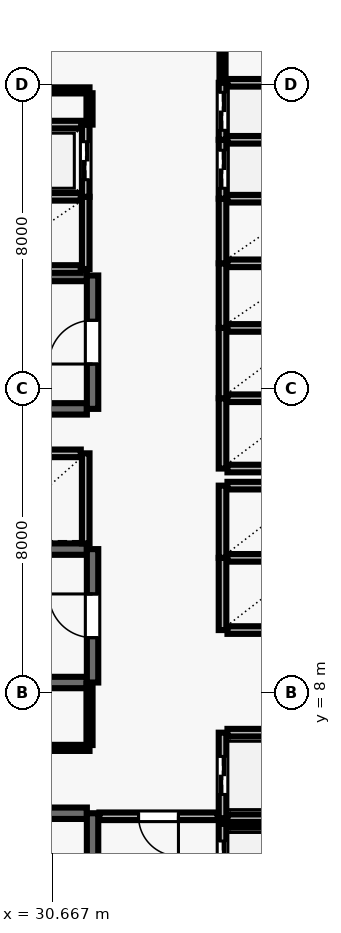
"""IFC4 building model, lengths in metres.
Left out: names, types, materials, properties, quantities, classifications, styles, units other than length and angle.
Written with IfcOpenShell. Run it as: python <this file> out.ifc"""

import sys

from ifc_helpers import new_model, si_unit, direction, frame, frame_2d, origin, place, context, subcontext, project, spatial, rectangle, extrude, element, fill, save


model = new_model("IFC4")
c1 = context("Model", 3, precision=1e-05, world=origin(), true_north=direction((0.0, 1.0)))
c2 = subcontext(c1, "Body", "Model", "MODEL_VIEW")
j1 = project(units=[si_unit("LENGTHUNIT", "METRE"), si_unit("PLANEANGLEUNIT", "RADIAN")], contexts=[c1])
p1 = place(None, origin())
s1 = spatial("IfcSite", under=j1, at=p1, CompositionType="ELEMENT")
p2 = place(p1, origin())
s2 = spatial("IfcBuilding", under=s1, at=p2, CompositionType="ELEMENT")
p3 = place(p2, frame((0.0, 0.0, 42.7)))
s3 = spatial("IfcBuildingStorey", under=s2, at=p3, CompositionType="ELEMENT", Elevation=42.7)
p4 = place(p3, frame((31.58, 4.83, 0.0), z_axis=(0.0, 0.0, 1.0), x_axis=(-1.0, 0.0, 0.0)))
e1 = element("IfcWall", 1, at=p4, inside=s3, PredefinedType="SHEAR", context=c2, shape_type="SweptSolid", body=[
    extrude(rectangle(XDim=8.36, YDim=0.3, at=frame_2d((4.18, 0.0))), origin(), (0.0, 0.0, 1.0), 3.69),
])
p5 = place(p3, frame((31.73, 0.96, 0.0), z_axis=(0.0, 0.0, 1.0), x_axis=(0.0, 1.0, 0.0)))
e2 = element("IfcWall", 2, at=p5, inside=s3, PredefinedType="SHEAR", context=c2, shape_type="SweptSolid", body=[
    extrude(rectangle(XDim=3.87, YDim=0.3, at=frame_2d((1.935, 0.0))), origin(), (0.0, 0.0, 1.0), 3.69),
])
p6 = place(p5, frame((1.54, 0.0, 0.0)))
e3 = element("IfcOpeningElement", 3, at=p6, cuts=e2, PredefinedType="OPENING", context=c2, shape_type="SweptSolid", body=[
    extrude(rectangle(XDim=1.15, YDim=2.15, at=frame_2d((0.575, 1.075))), frame((0.0, 0.16, 0.0), z_axis=(0.0, -1.0, 0.0), x_axis=(1.0, 0.0, 0.0)), (0.0, 0.0, 1.0), 0.32),
])
for number, where, z_axis, x_axis in (
    (4, (31.58, 18.98, 0.0), (0.0, 0.0, 1.0), (-1.0, 0.0, 0.0)),
    (5, (23.22, 15.47, 0.0), (0.0, 0.0, 1.0), (1.0, 0.0, 0.0)),
):
    element("IfcWall", number, at=place(p3, frame(where, z_axis=z_axis, x_axis=x_axis)), inside=s3, PredefinedType="SHEAR", context=c2, shape_type="SweptSolid", body=[
        extrude(rectangle(XDim=8.36, YDim=0.3, at=frame_2d((4.18, 0.0))), origin(), (0.0, 0.0, 1.0), 3.69),
    ])
p7 = place(p3, frame((31.73, 15.47, 0.0), z_axis=(0.0, 0.0, 1.0), x_axis=(0.0, 1.0, 0.0)))
e6 = element("IfcWall", 6, at=p7, inside=s3, PredefinedType="SHEAR", context=c2, shape_type="SweptSolid", body=[
    extrude(rectangle(XDim=3.51, YDim=0.3, at=frame_2d((1.755, 0.0))), origin(), (0.0, 0.0, 1.0), 3.69),
])
p8 = place(p7, frame((1.18, 0.0, 0.0)))
e7 = element("IfcOpeningElement", 7, at=p8, cuts=e6, PredefinedType="OPENING", context=c2, shape_type="SweptSolid", body=[
    extrude(rectangle(XDim=1.15, YDim=2.15, at=frame_2d((0.575, 1.075))), frame((0.0, 0.16, 0.0), z_axis=(0.0, -1.0, 0.0), x_axis=(1.0, 0.0, 0.0)), (0.0, 0.0, 1.0), 0.32),
])
for number, where, z_axis, x_axis in (
    (8, (31.58, 11.78, 0.0), (0.0, 0.0, 1.0), (-1.0, 0.0, 0.0)),
    (9, (23.22, 8.27, 0.0), (0.0, 0.0, 1.0), (1.0, 0.0, 0.0)),
):
    element("IfcWall", number, at=place(p3, frame(where, z_axis=z_axis, x_axis=x_axis)), inside=s3, PredefinedType="SHEAR", context=c2, shape_type="SweptSolid", body=[
        extrude(rectangle(XDim=8.36, YDim=0.3, at=frame_2d((4.18, 0.0))), origin(), (0.0, 0.0, 1.0), 3.69),
    ])
p9 = place(p3, frame((31.73, 8.27, 0.0), z_axis=(0.0, 0.0, 1.0), x_axis=(0.0, 1.0, 0.0)))
e10 = element("IfcWall", 10, at=p9, inside=s3, PredefinedType="SHEAR", context=c2, shape_type="SweptSolid", body=[
    extrude(rectangle(XDim=3.51, YDim=0.3, at=frame_2d((1.755, 0.0))), origin(), (0.0, 0.0, 1.0), 3.69),
])
p10 = place(p9, frame((1.18, 0.0, 0.0)))
e11 = element("IfcOpeningElement", 11, at=p10, cuts=e10, PredefinedType="OPENING", context=c2, shape_type="SweptSolid", body=[
    extrude(rectangle(XDim=1.15, YDim=2.15, at=frame_2d((0.575, 1.075))), frame((0.0, 0.16, 0.0), z_axis=(0.0, -1.0, 0.0), x_axis=(1.0, 0.0, 0.0)), (0.0, 0.0, 1.0), 0.32),
])
p11 = place(p3, frame((35.15, 4.55, 0.0), z_axis=(0.0, 0.0, 1.0), x_axis=(0.0, -1.0, 0.0)))
e12 = element("IfcWall", 12, at=p11, inside=s3, PredefinedType="SOLIDWALL", context=c2, shape_type="SweptSolid", body=[
    extrude(rectangle(XDim=2.1, YDim=0.2, at=frame_2d((1.05, 0.0))), origin(), (0.0, 0.0, 1.0), 3.69),
])
p12 = place(p11, frame((0.45, 0.0, 0.0)))
e13 = element("IfcOpeningElement", 13, at=p12, cuts=e12, PredefinedType="OPENING", context=c2, shape_type="SweptSolid", body=[
    extrude(rectangle(XDim=1.2, YDim=2.15, at=frame_2d((0.6, 1.075))), frame((0.0, 0.11, 0.0), z_axis=(0.0, -1.0, 0.0), x_axis=(1.0, 0.0, 0.0)), (0.0, 0.0, 1.0), 0.22),
])
p13 = place(p3, frame((37.42, 4.55, 0.0), z_axis=(0.0, 0.0, 1.0), x_axis=(-1.0, 0.0, 0.0)))
e14 = element("IfcWall", 14, at=p13, inside=s3, PredefinedType="SOLIDWALL", context=c2, shape_type="SweptSolid", body=[
    extrude(rectangle(XDim=2.14, YDim=0.2, at=frame_2d((1.07, 0.0))), origin(), (0.0, 0.0, 1.0), 3.69),
])
p14 = place(p3, frame((35.15, 6.95, 0.0), z_axis=(0.0, 0.0, 1.0), x_axis=(0.0, -1.0, 0.0)))
e15 = element("IfcWall", 15, at=p14, inside=s3, PredefinedType="SOLIDWALL", context=c2, shape_type="SweptSolid", body=[
    extrude(rectangle(XDim=2.25, YDim=0.2, at=frame_2d((1.125, 0.0))), origin(), (0.0, 0.0, 1.0), 3.69),
])
p15 = place(p14, frame((0.625, 0.0, 0.0)))
e16 = element("IfcOpeningElement", 16, at=p15, cuts=e15, PredefinedType="OPENING", context=c2, shape_type="SweptSolid", body=[
    extrude(rectangle(XDim=1.0, YDim=2.1, at=frame_2d((0.5, 1.05))), frame((0.0, 0.11, 0.0), z_axis=(0.0, -1.0, 0.0), x_axis=(1.0, 0.0, 0.0)), (0.0, 0.0, 1.0), 0.22),
])
for number, where, z_axis, x_axis in (
    (17, (35.28, 4.7, 0.0), (0.0, 0.0, 1.0), (1.0, 0.0, 0.0)),
    (18, (37.42, 6.95, 0.0), (0.0, 0.0, 1.0), (-1.0, 0.0, 0.0)),
):
    element("IfcWall", number, at=place(p3, frame(where, z_axis=z_axis, x_axis=x_axis)), inside=s3, PredefinedType="SOLIDWALL", context=c2, shape_type="SweptSolid", body=[
        extrude(rectangle(XDim=2.14, YDim=0.2, at=frame_2d((1.07, 0.0))), origin(), (0.0, 0.0, 1.0), 3.69),
    ])
p16 = place(p3, frame((35.15, 11.55, 0.0), z_axis=(0.0, 0.0, 1.0), x_axis=(0.0, -1.0, 0.0)))
e19 = element("IfcWall", 19, at=p16, inside=s3, PredefinedType="SOLIDWALL", context=c2, shape_type="SweptSolid", body=[
    extrude(rectangle(XDim=1.9, YDim=0.2, at=frame_2d((0.95, 0.0))), origin(), (0.0, 0.0, 1.0), 3.69),
])
for number, where, z_axis, x_axis in (
    (20, (35.28, 9.65, 0.0), (0.0, 0.0, 1.0), (1.0, 0.0, 0.0)),
    (21, (37.42, 11.55, 0.0), (0.0, 0.0, 1.0), (-1.0, 0.0, 0.0)),
):
    element("IfcWall", number, at=place(p3, frame(where, z_axis=z_axis, x_axis=x_axis)), inside=s3, PredefinedType="SOLIDWALL", context=c2, shape_type="SweptSolid", body=[
        extrude(rectangle(XDim=2.14, YDim=0.2, at=frame_2d((1.07, 0.0))), origin(), (0.0, 0.0, 1.0), 3.69),
    ])
p17 = place(p3, frame((35.15, 13.45, 0.0), z_axis=(0.0, 0.0, 1.0), x_axis=(0.0, -1.0, 0.0)))
e22 = element("IfcWall", 22, at=p17, inside=s3, PredefinedType="SOLIDWALL", context=c2, shape_type="SweptSolid", body=[
    extrude(rectangle(XDim=1.9, YDim=0.2, at=frame_2d((0.95, 0.0))), origin(), (0.0, 0.0, 1.0), 3.69),
])
p18 = place(p3, frame((37.42, 13.45, 0.0), z_axis=(0.0, 0.0, 1.0), x_axis=(-1.0, 0.0, 0.0)))
e23 = element("IfcWall", 23, at=p18, inside=s3, PredefinedType="SOLIDWALL", context=c2, shape_type="SweptSolid", body=[
    extrude(rectangle(XDim=2.14, YDim=0.2, at=frame_2d((1.07, 0.0))), origin(), (0.0, 0.0, 1.0), 3.69),
])
p19 = place(p3, frame((31.55, 11.93, 0.0), z_axis=(0.0, 0.0, 1.0), x_axis=(0.0, 1.0, 0.0)))
e24 = element("IfcWall", 24, at=p19, inside=s3, PredefinedType="SOLIDWALL", context=c2, shape_type="SweptSolid", body=[
    extrude(rectangle(XDim=2.37, YDim=0.2, at=frame_2d((1.185, 0.0))), origin(), (0.0, 0.0, 1.0), 3.69),
])
p20 = place(p3, frame((31.42, 14.3, 0.0), z_axis=(0.0, 0.0, 1.0), x_axis=(-1.0, 0.0, 0.0)))
e25 = element("IfcWall", 25, at=p20, inside=s3, PredefinedType="SOLIDWALL", context=c2, shape_type="SweptSolid", body=[
    extrude(rectangle(XDim=2.44, YDim=0.2, at=frame_2d((1.22, 0.0))), origin(), (0.0, 0.0, 1.0), 3.69),
])
p21 = place(p3, frame((35.15, 15.75, 0.0), z_axis=(0.0, 0.0, 1.0), x_axis=(0.0, -1.0, 0.0)))
e26 = element("IfcWall", 26, at=p21, inside=s3, PredefinedType="SOLIDWALL", context=c2, shape_type="SweptSolid", body=[
    extrude(rectangle(XDim=1.85, YDim=0.2, at=frame_2d((0.925, 0.0))), origin(), (0.0, 0.0, 1.0), 3.69),
])
for number, where, z_axis, x_axis in (
    (27, (35.28, 13.9, 0.0), (0.0, 0.0, 1.0), (1.0, 0.0, 0.0)),
    (28, (37.42, 15.75, 0.0), (0.0, 0.0, 1.0), (-1.0, 0.0, 0.0)),
):
    element("IfcWall", number, at=place(p3, frame(where, z_axis=z_axis, x_axis=x_axis)), inside=s3, PredefinedType="SOLIDWALL", context=c2, shape_type="SweptSolid", body=[
        extrude(rectangle(XDim=2.14, YDim=0.2, at=frame_2d((1.07, 0.0))), origin(), (0.0, 0.0, 1.0), 3.69),
    ])
p22 = place(p3, frame((35.15, 17.6, 0.0), z_axis=(0.0, 0.0, 1.0), x_axis=(0.0, -1.0, 0.0)))
e29 = element("IfcWall", 29, at=p22, inside=s3, PredefinedType="SOLIDWALL", context=c2, shape_type="SweptSolid", body=[
    extrude(rectangle(XDim=1.85, YDim=0.2, at=frame_2d((0.925, 0.0))), origin(), (0.0, 0.0, 1.0), 3.69),
])
p23 = place(p3, frame((37.42, 17.6, 0.0), z_axis=(0.0, 0.0, 1.0), x_axis=(-1.0, 0.0, 0.0)))
e30 = element("IfcWall", 30, at=p23, inside=s3, PredefinedType="SOLIDWALL", context=c2, shape_type="SweptSolid", body=[
    extrude(rectangle(XDim=2.14, YDim=0.2, at=frame_2d((1.07, 0.0))), origin(), (0.0, 0.0, 1.0), 3.69),
])
p24 = place(p3, frame((35.15, 19.3, 0.0), z_axis=(0.0, 0.0, 1.0), x_axis=(0.0, -1.0, 0.0)))
e31 = element("IfcWall", 31, at=p24, inside=s3, PredefinedType="SOLIDWALL", context=c2, shape_type="SweptSolid", body=[
    extrude(rectangle(XDim=1.7, YDim=0.2, at=frame_2d((0.85, 0.0))), origin(), (0.0, 0.0, 1.0), 3.69),
])
p25 = place(p3, frame((37.42, 19.3, 0.0), z_axis=(0.0, 0.0, 1.0), x_axis=(-1.0, 0.0, 0.0)))
e32 = element("IfcWall", 32, at=p25, inside=s3, PredefinedType="SOLIDWALL", context=c2, shape_type="SweptSolid", body=[
    extrude(rectangle(XDim=2.14, YDim=0.2, at=frame_2d((1.07, 0.0))), origin(), (0.0, 0.0, 1.0), 3.69),
])
p26 = place(p3, frame((35.15, 21.0, 0.0), z_axis=(0.0, 0.0, 1.0), x_axis=(0.0, -1.0, 0.0)))
e33 = element("IfcWall", 33, at=p26, inside=s3, PredefinedType="SOLIDWALL", context=c2, shape_type="SweptSolid", body=[
    extrude(rectangle(XDim=1.7, YDim=0.2, at=frame_2d((0.85, 0.0))), origin(), (0.0, 0.0, 1.0), 3.69),
])
p27 = place(p3, frame((37.42, 21.0, 0.0), z_axis=(0.0, 0.0, 1.0), x_axis=(-1.0, 0.0, 0.0)))
e34 = element("IfcWall", 34, at=p27, inside=s3, PredefinedType="SOLIDWALL", context=c2, shape_type="SweptSolid", body=[
    extrude(rectangle(XDim=2.14, YDim=0.2, at=frame_2d((1.07, 0.0))), origin(), (0.0, 0.0, 1.0), 3.69),
])
p28 = place(p3, frame((31.55, 19.15, 0.0), z_axis=(0.0, 0.0, 1.0), x_axis=(0.0, 1.0, 0.0)))
e35 = element("IfcWall", 35, at=p28, inside=s3, PredefinedType="SOLIDWALL", context=c2, shape_type="SweptSolid", body=[
    extrude(rectangle(XDim=1.9, YDim=0.2, at=frame_2d((0.95, 0.0))), origin(), (0.0, 0.0, 1.0), 3.69),
])
for number, where, z_axis, x_axis in (
    (36, (28.98, 19.15, 0.0), (0.0, 0.0, 1.0), (1.0, 0.0, 0.0)),
    (37, (31.42, 21.05, 0.0), (0.0, 0.0, 1.0), (-1.0, 0.0, 0.0)),
):
    element("IfcWall", number, at=place(p3, frame(where, z_axis=z_axis, x_axis=x_axis)), inside=s3, PredefinedType="SOLIDWALL", context=c2, shape_type="SweptSolid", body=[
        extrude(rectangle(XDim=2.44, YDim=0.2, at=frame_2d((1.22, 0.0))), origin(), (0.0, 0.0, 1.0), 3.69),
    ])
p29 = place(p3, frame((35.15, 22.55, 0.0), z_axis=(0.0, 0.0, 1.0), x_axis=(0.0, -1.0, 0.0)))
e38 = element("IfcWall", 38, at=p29, inside=s3, PredefinedType="SOLIDWALL", context=c2, shape_type="SweptSolid", body=[
    extrude(rectangle(XDim=1.55, YDim=0.2, at=frame_2d((0.775, 0.0))), origin(), (0.0, 0.0, 1.0), 3.69),
])
p30 = place(p29, frame((0.275, 0.0, 0.0)))
e39 = element("IfcOpeningElement", 39, at=p30, cuts=e38, PredefinedType="OPENING", context=c2, shape_type="SweptSolid", body=[
    extrude(rectangle(XDim=1.0, YDim=2.1, at=frame_2d((0.5, 1.05))), frame((0.0, 0.11, 0.0), z_axis=(0.0, -1.0, 0.0), x_axis=(1.0, 0.0, 0.0)), (0.0, 0.0, 1.0), 0.22),
])
p31 = place(p3, frame((37.42, 22.55, 0.0), z_axis=(0.0, 0.0, 1.0), x_axis=(-1.0, 0.0, 0.0)))
e40 = element("IfcWall", 40, at=p31, inside=s3, PredefinedType="SOLIDWALL", context=c2, shape_type="SweptSolid", body=[
    extrude(rectangle(XDim=2.14, YDim=0.2, at=frame_2d((1.07, 0.0))), origin(), (0.0, 0.0, 1.0), 3.69),
])
p32 = place(p3, frame((35.15, 24.05, 0.0), z_axis=(0.0, 0.0, 1.0), x_axis=(0.0, -1.0, 0.0)))
e41 = element("IfcWall", 41, at=p32, inside=s3, PredefinedType="SOLIDWALL", context=c2, shape_type="SweptSolid", body=[
    extrude(rectangle(XDim=1.5, YDim=0.2, at=frame_2d((0.75, 0.0))), origin(), (0.0, 0.0, 1.0), 3.69),
])
p33 = place(p32, frame((0.25, 0.0, 0.0)))
e42 = element("IfcOpeningElement", 42, at=p33, cuts=e41, PredefinedType="OPENING", context=c2, shape_type="SweptSolid", body=[
    extrude(rectangle(XDim=1.0, YDim=2.1, at=frame_2d((0.5, 1.05))), frame((0.0, 0.11, 0.0), z_axis=(0.0, -1.0, 0.0), x_axis=(1.0, 0.0, 0.0)), (0.0, 0.0, 1.0), 0.22),
])
p34 = place(p3, frame((37.42, 24.05, 0.0), z_axis=(0.0, 0.0, 1.0), x_axis=(-1.0, 0.0, 0.0)))
e43 = element("IfcWall", 43, at=p34, inside=s3, PredefinedType="SOLIDWALL", context=c2, shape_type="SweptSolid", body=[
    extrude(rectangle(XDim=2.14, YDim=0.2, at=frame_2d((1.07, 0.0))), origin(), (0.0, 0.0, 1.0), 3.69),
])
p35 = place(p3, frame((31.55, 21.05, 0.0), z_axis=(0.0, 0.0, 1.0), x_axis=(0.0, 1.0, 0.0)))
e44 = element("IfcWall", 44, at=p35, inside=s3, PredefinedType="SOLIDWALL", context=c2, shape_type="SweptSolid", body=[
    extrude(rectangle(XDim=1.9, YDim=0.2, at=frame_2d((0.95, 0.0))), origin(), (0.0, 0.0, 1.0), 3.69),
])
p36 = place(p35, frame((0.45, 0.0, 0.0)))
e45 = element("IfcOpeningElement", 45, at=p36, cuts=e44, PredefinedType="OPENING", context=c2, shape_type="SweptSolid", body=[
    extrude(rectangle(XDim=1.0, YDim=2.1, at=frame_2d((0.5, 1.05))), frame((0.0, 0.11, 0.0), z_axis=(0.0, -1.0, 0.0), x_axis=(1.0, 0.0, 0.0)), (0.0, 0.0, 1.0), 0.22),
])
p37 = place(p3, frame((31.43, 22.95, 0.0), z_axis=(0.0, 0.0, 1.0), x_axis=(-1.0, 0.0, 0.0)))
e46 = element("IfcWall", 46, at=p37, inside=s3, PredefinedType="SOLIDWALL", context=c2, shape_type="SweptSolid", body=[
    extrude(rectangle(XDim=2.46, YDim=0.2, at=frame_2d((1.23, 0.0))), origin(), (0.0, 0.0, 1.0), 3.69),
])
p38 = place(p3, frame((28.8, 23.85, 0.0), z_axis=(0.0, 0.0, 1.0), x_axis=(1.0, 0.0, 0.0)))
e47 = element("IfcWall", 47, at=p38, inside=s3, PredefinedType="PARTITIONING", context=c2, shape_type="SweptSolid", body=[
    extrude(rectangle(XDim=2.85, YDim=0.16, at=frame_2d((1.425, 0.0))), origin(), (0.0, 0.0, 1.0), 3.69),
])
p39 = place(p3, frame((31.65, 6.55, 0.0), z_axis=(0.0, 0.0, 1.0), x_axis=(-1.0, 0.0, 0.0)))
e48 = element("IfcWall", 48, at=p39, inside=s3, PredefinedType="PARTITIONING", context=c2, shape_type="SweptSolid", body=[
    extrude(rectangle(XDim=4.75, YDim=0.16, at=frame_2d((2.375, 0.0))), origin(), (0.0, 0.0, 1.0), 3.69),
])
p40 = place(p39, frame((1.935, 0.0, 0.0)))
e49 = element("IfcOpeningElement", 49, at=p40, cuts=e48, PredefinedType="OPENING", context=c2, shape_type="SweptSolid", body=[
    extrude(rectangle(XDim=0.88, YDim=2.1, at=frame_2d((0.44, 1.05))), frame((0.0, 0.09, 0.0), z_axis=(0.0, -1.0, 0.0), x_axis=(1.0, 0.0, 0.0)), (0.0, 0.0, 1.0), 0.18),
])
p41 = place(p3, frame((35.02, 4.75, 0.0), z_axis=(0.0, 0.0, 1.0), x_axis=(-1.0, 0.0, 0.0)))
e50 = element("IfcWall", 50, at=p41, inside=s3, PredefinedType="SOLIDWALL", context=c2, shape_type="SweptSolid", body=[
    extrude(rectangle(XDim=3.11, YDim=0.2, at=frame_2d((1.555, 0.0))), origin(), (0.0, 0.0, 1.0), 3.69),
])
p42 = place(p41, frame((1.03, 0.0, 0.0)))
e51 = element("IfcOpeningElement", 51, at=p42, cuts=e50, PredefinedType="OPENING", context=c2, shape_type="SweptSolid", body=[
    extrude(rectangle(XDim=1.05, YDim=2.15, at=frame_2d((0.525, 1.075))), frame((0.0, 0.11, 0.0), z_axis=(0.0, -1.0, 0.0), x_axis=(1.0, 0.0, 0.0)), (0.0, 0.0, 1.0), 0.22),
])
p43 = place(p3, frame((31.65, 8.24, 0.0), z_axis=(0.0, 0.0, 1.0), x_axis=(0.0, -1.0, 0.0)))
e52 = element("IfcWall", 52, at=p43, inside=s3, PredefinedType="PARTITIONING", context=c2, shape_type="SweptSolid", body=[
    extrude(rectangle(XDim=1.615, YDim=0.16, at=frame_2d((0.808, 0.0))), origin(), (0.0, 0.0, 1.0), 3.69),
])
p44 = place(p3, frame((31.65, 23.775, 0.0), z_axis=(0.0, 0.0, 1.0), x_axis=(0.0, -1.0, 0.0)))
e53 = element("IfcWall", 53, at=p44, inside=s3, PredefinedType="PARTITIONING", context=c2, shape_type="SweptSolid", body=[
    extrude(rectangle(XDim=0.825, YDim=0.16, at=frame_2d((0.413, 0.0))), origin(), (0.0, 0.0, 1.0), 3.69),
])
p45 = place(p3, frame((35.15, 24.07, 0.0), z_axis=(0.0, 0.0, 1.0), x_axis=(0.0, 1.0, 0.0)))
e54 = element("IfcWall", 54, at=p45, inside=s3, PredefinedType="PARTITIONING", context=c2, shape_type="SweptSolid", body=[
    extrude(rectangle(XDim=1.855, YDim=0.16, at=frame_2d((0.927, 0.0))), origin(), (0.0, 0.0, 1.0), 3.69),
])
p46 = place(p8, origin())
e55 = element("IfcDoor", 55, at=p46, inside=s3, OperationType="SINGLE_SWING_LEFT", PredefinedType="DOOR", context=c2, shape_type="SweptSolid", body=[
    extrude(rectangle(XDim=1.15, YDim=2.15, at=frame_2d((0.575, 1.075))), frame((0.0, 0.025, 0.0), z_axis=(0.0, -1.0, 0.0), x_axis=(1.0, 0.0, 0.0)), (0.0, 0.0, 1.0), 0.05),
])
fill(e7, e55)
p47 = place(p10, origin())
e56 = element("IfcDoor", 56, at=p47, inside=s3, OperationType="SINGLE_SWING_RIGHT", PredefinedType="DOOR", context=c2, shape_type="SweptSolid", body=[
    extrude(rectangle(XDim=1.15, YDim=2.15, at=frame_2d((0.575, 1.075))), frame((0.0, 0.025, 0.0), z_axis=(0.0, -1.0, 0.0), x_axis=(1.0, 0.0, 0.0)), (0.0, 0.0, 1.0), 0.05),
])
fill(e11, e56)
p48 = place(p12, origin())
e57 = element("IfcDoor", 57, at=p48, inside=s3, OperationType="DOUBLE_DOOR_SLIDING", PredefinedType="DOOR", context=c2, shape_type="SweptSolid", body=[
    extrude(rectangle(XDim=1.2, YDim=2.15, at=frame_2d((0.6, 1.075))), frame((0.0, 0.025, 0.0), z_axis=(0.0, -1.0, 0.0), x_axis=(1.0, 0.0, 0.0)), (0.0, 0.0, 1.0), 0.05),
])
fill(e13, e57)
p49 = place(p15, origin())
e58 = element("IfcDoor", 58, at=p49, inside=s3, OperationType="DOUBLE_DOOR_SLIDING", PredefinedType="DOOR", context=c2, shape_type="SweptSolid", body=[
    extrude(rectangle(XDim=1.0, YDim=2.1, at=frame_2d((0.5, 1.05))), frame((0.0, 0.025, 0.0), z_axis=(0.0, -1.0, 0.0), x_axis=(1.0, 0.0, 0.0)), (0.0, 0.0, 1.0), 0.05),
])
fill(e16, e58)
p50 = place(p30, origin())
e59 = element("IfcDoor", 59, at=p50, inside=s3, OperationType="DOUBLE_DOOR_SLIDING", PredefinedType="DOOR", context=c2, shape_type="SweptSolid", body=[
    extrude(rectangle(XDim=1.0, YDim=2.1, at=frame_2d((0.5, 1.05))), frame((0.0, 0.025, 0.0), z_axis=(0.0, -1.0, 0.0), x_axis=(1.0, 0.0, 0.0)), (0.0, 0.0, 1.0), 0.05),
])
fill(e39, e59)
p51 = place(p33, origin())
e60 = element("IfcDoor", 60, at=p51, inside=s3, OperationType="DOUBLE_DOOR_SLIDING", PredefinedType="DOOR", context=c2, shape_type="SweptSolid", body=[
    extrude(rectangle(XDim=1.0, YDim=2.1, at=frame_2d((0.5, 1.05))), frame((0.0, 0.025, 0.0), z_axis=(0.0, -1.0, 0.0), x_axis=(1.0, 0.0, 0.0)), (0.0, 0.0, 1.0), 0.05),
])
fill(e42, e60)
p52 = place(p36, origin())
e61 = element("IfcDoor", 61, at=p52, inside=s3, OperationType="DOUBLE_DOOR_SLIDING", PredefinedType="DOOR", context=c2, shape_type="SweptSolid", body=[
    extrude(rectangle(XDim=1.0, YDim=2.1, at=frame_2d((0.5, 1.05))), frame((0.0, 0.025, 0.0), z_axis=(0.0, -1.0, 0.0), x_axis=(1.0, 0.0, 0.0)), (0.0, 0.0, 1.0), 0.05),
])
fill(e45, e61)
p53 = place(p42, origin())
e62 = element("IfcDoor", 62, at=p53, inside=s3, OperationType="SINGLE_SWING_LEFT", PredefinedType="DOOR", context=c2, shape_type="SweptSolid", body=[
    extrude(rectangle(XDim=1.05, YDim=2.15, at=frame_2d((0.525, 1.075))), frame((0.0, 0.025, 0.0), z_axis=(0.0, -1.0, 0.0), x_axis=(1.0, 0.0, 0.0)), (0.0, 0.0, 1.0), 0.05),
])
fill(e51, e62)
save(model, sys.argv[1])
